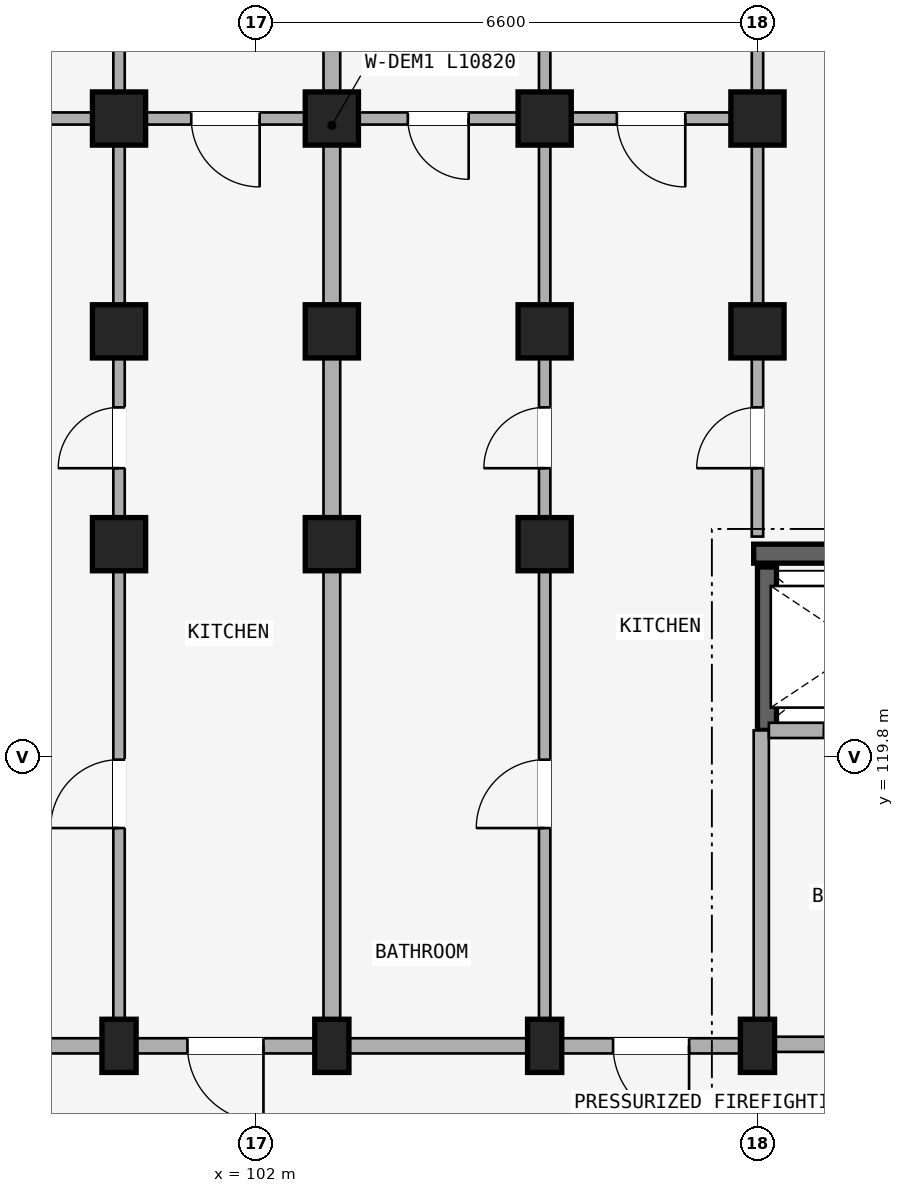
"""IFC4 building model, lengths in metres.
Left out: names, types, materials, properties, quantities, classifications, styles, units other than length and angle.
Written with IfcOpenShell. Run it as: python <this file> out.ifc"""

import sys

from ifc_helpers import new_model, si_unit, direction, frame, frame_2d, origin, origin_2d, place, context, subcontext, project, spatial, rectangle, extrude, element, fill, save


model = new_model("IFC4")
c1 = context("Model", 3, precision=1e-05, world=origin(), true_north=direction((0.0, 1.0)))
c2 = subcontext(c1, "Body", "Model", "MODEL_VIEW")
j1 = project(units=[si_unit("LENGTHUNIT", "METRE"), si_unit("PLANEANGLEUNIT", "RADIAN")], contexts=[c1])
p1 = place(None, origin())
s1 = spatial("IfcSite", under=j1, at=p1, CompositionType="ELEMENT")
p2 = place(p1, origin())
s2 = spatial("IfcBuilding", under=s1, at=p2, CompositionType="ELEMENT")
p3 = place(p2, frame((0.0, 0.0, 21.3)))
s3 = spatial("IfcBuildingStorey", under=s2, at=p3, CompositionType="ELEMENT", Elevation=21.3)
p4 = place(p3, frame((111.35, 122.475, 0.0), z_axis=(0.0, 0.0, 1.0), x_axis=(-1.0, 0.0, 0.0)))
e1 = element("IfcWall", 1, at=p4, inside=s3, PredefinedType="SHEAR", context=c2, shape_type="SweptSolid", body=[
    extrude(rectangle(XDim=2.8, YDim=0.25, at=frame_2d((1.4, 0.0))), origin(), (0.0, 0.0, 1.0), 2.93),
])
p5 = place(p3, frame((108.725, 120.15, 0.0), z_axis=(0.0, 0.0, 1.0), x_axis=(0.0, 1.0, 0.0)))
e2 = element("IfcWall", 2, at=p5, inside=s3, PredefinedType="SHEAR", context=c2, shape_type="SweptSolid", body=[
    extrude(rectangle(XDim=2.15, YDim=0.25, at=frame_2d((1.075, 0.0))), origin(), (0.0, 0.0, 1.0), 2.93),
])
p6 = place(p3, frame((108.6, 116.0, 0.0), z_axis=(0.0, 0.0, 1.0), x_axis=(1.0, 0.0, 0.0)))
e3 = element("IfcColumn", 3, at=p6, inside=s3, PredefinedType="COLUMN", context=c2, shape_type="SweptSolid", body=[
    extrude(rectangle(XDim=0.45, YDim=0.7, at=origin_2d()), origin(), (0.0, 0.0, 1.0), 2.93),
])
for number, where, z_axis, x_axis in (
    (4, (108.6, 125.4, 0.0), (0.0, 0.0, 1.0), (1.0, 0.0, 0.0)),
    (5, (108.6, 128.2, 0.0), (0.0, 0.0, 1.0), (1.0, 0.0, 0.0)),
):
    element("IfcColumn", number, at=place(p3, frame(where, z_axis=z_axis, x_axis=x_axis)), inside=s3, PredefinedType="COLUMN", context=c2, shape_type="SweptSolid", body=[
        extrude(rectangle(XDim=0.7, YDim=0.7, at=origin_2d()), origin(), (0.0, 0.0, 1.0), 2.93),
    ])
p7 = place(p3, frame((105.8, 116.0, 0.0), z_axis=(0.0, 0.0, 1.0), x_axis=(1.0, 0.0, 0.0)))
e6 = element("IfcColumn", 6, at=p7, inside=s3, PredefinedType="COLUMN", context=c2, shape_type="SweptSolid", body=[
    extrude(rectangle(XDim=0.45, YDim=0.7, at=origin_2d()), origin(), (0.0, 0.0, 1.0), 2.93),
])
for number, where, z_axis, x_axis in (
    (7, (105.8, 122.6, 0.0), (0.0, 0.0, 1.0), (1.0, 0.0, 0.0)),
    (8, (105.8, 125.4, 0.0), (0.0, 0.0, 1.0), (1.0, 0.0, 0.0)),
    (9, (105.8, 128.2, 0.0), (0.0, 0.0, 1.0), (1.0, 0.0, 0.0)),
):
    element("IfcColumn", number, at=place(p3, frame(where, z_axis=z_axis, x_axis=x_axis)), inside=s3, PredefinedType="COLUMN", context=c2, shape_type="SweptSolid", body=[
        extrude(rectangle(XDim=0.7, YDim=0.7, at=origin_2d()), origin(), (0.0, 0.0, 1.0), 2.93),
    ])
p8 = place(p3, frame((103.0, 116.0, 0.0), z_axis=(0.0, 0.0, 1.0), x_axis=(1.0, 0.0, 0.0)))
e10 = element("IfcColumn", 10, at=p8, inside=s3, PredefinedType="COLUMN", context=c2, shape_type="SweptSolid", body=[
    extrude(rectangle(XDim=0.45, YDim=0.7, at=origin_2d()), origin(), (0.0, 0.0, 1.0), 2.93),
])
for number, where, z_axis, x_axis in (
    (11, (103.0, 122.6, 0.0), (0.0, 0.0, 1.0), (1.0, 0.0, 0.0)),
    (12, (103.0, 125.4, 0.0), (0.0, 0.0, 1.0), (1.0, 0.0, 0.0)),
    (13, (103.0, 128.2, 0.0), (0.0, 0.0, 1.0), (1.0, 0.0, 0.0)),
):
    element("IfcColumn", number, at=place(p3, frame(where, z_axis=z_axis, x_axis=x_axis)), inside=s3, PredefinedType="COLUMN", context=c2, shape_type="SweptSolid", body=[
        extrude(rectangle(XDim=0.7, YDim=0.7, at=origin_2d()), origin(), (0.0, 0.0, 1.0), 2.93),
    ])
p9 = place(p3, frame((100.2, 116.0, 0.0), z_axis=(0.0, 0.0, 1.0), x_axis=(1.0, 0.0, 0.0)))
e14 = element("IfcColumn", 14, at=p9, inside=s3, PredefinedType="COLUMN", context=c2, shape_type="SweptSolid", body=[
    extrude(rectangle(XDim=0.45, YDim=0.7, at=origin_2d()), origin(), (0.0, 0.0, 1.0), 2.93),
])
for number, where, z_axis, x_axis in (
    (15, (100.2, 122.6, 0.0), (0.0, 0.0, 1.0), (1.0, 0.0, 0.0)),
    (16, (100.2, 125.4, 0.0), (0.0, 0.0, 1.0), (1.0, 0.0, 0.0)),
    (17, (100.2, 128.2, 0.0), (0.0, 0.0, 1.0), (1.0, 0.0, 0.0)),
):
    element("IfcColumn", number, at=place(p3, frame(where, z_axis=z_axis, x_axis=x_axis)), inside=s3, PredefinedType="COLUMN", context=c2, shape_type="SweptSolid", body=[
        extrude(rectangle(XDim=0.7, YDim=0.7, at=origin_2d()), origin(), (0.0, 0.0, 1.0), 2.93),
    ])
p10 = place(p3, frame((114.3, 116.02, 0.0), z_axis=(0.0, 0.0, 1.0), x_axis=(-1.0, 0.0, 0.0)))
e18 = element("IfcWall", 18, at=p10, inside=s3, PredefinedType="STANDARD", context=c2, shape_type="SweptSolid", body=[
    extrude(rectangle(XDim=5.65, YDim=0.2, at=frame_2d((2.825, 0.0))), origin(), (0.0, 0.0, 1.0), 2.372),
])
p11 = place(p10, frame((1.923, 0.0, 0.0)))
e19 = element("IfcOpeningElement", 19, at=p11, cuts=e18, PredefinedType="OPENING", context=c2, shape_type="SweptSolid", body=[
    extrude(rectangle(XDim=1.24, YDim=2.15, at=frame_2d((0.62, 1.075))), frame((0.0, 0.11, 0.0), z_axis=(0.0, -1.0, 0.0), x_axis=(1.0, 0.0, 0.0)), (0.0, 0.0, 1.0), 0.22),
])
p12 = place(p3, frame((108.65, 116.02, 0.0), z_axis=(0.0, 0.0, 1.0), x_axis=(0.0, 1.0, 0.0)))
e20 = element("IfcWall", 20, at=p12, inside=s3, PredefinedType="STANDARD", context=c2, shape_type="SweptSolid", body=[
    extrude(rectangle(XDim=4.13, YDim=0.2, at=frame_2d((2.065, 0.0))), origin(), (0.0, 0.0, 1.0), 2.372),
])
p13 = place(p3, frame((111.3, 120.15, 0.0), z_axis=(0.0, 0.0, 1.0), x_axis=(-1.0, 0.0, 0.0)))
e21 = element("IfcWall", 21, at=p13, inside=s3, PredefinedType="STANDARD", context=c2, shape_type="SweptSolid", body=[
    extrude(rectangle(XDim=2.55, YDim=0.2, at=frame_2d((1.275, 0.0))), origin(), (0.0, 0.0, 1.0), 2.372),
])
p14 = place(p13, frame((0.725, 0.0, 0.0)))
e22 = element("IfcOpeningElement", 22, at=p14, cuts=e21, PredefinedType="OPENING", context=c2, shape_type="SweptSolid", body=[
    extrude(rectangle(XDim=1.1, YDim=2.15, at=frame_2d((0.55, 1.075))), frame((0.0, 0.11, 0.0), z_axis=(0.0, -1.0, 0.0), x_axis=(1.0, 0.0, 0.0)), (0.0, 0.0, 1.0), 0.22),
])
p15 = place(p3, frame((108.6, 116.0, 0.0), z_axis=(0.0, 0.0, 1.0), x_axis=(-1.0, 0.0, 0.0)))
e23 = element("IfcWall", 23, at=p15, inside=s3, PredefinedType="STANDARD", context=c2, shape_type="SweptSolid", body=[
    extrude(rectangle(XDim=2.8, YDim=0.2, at=frame_2d((1.4, 0.0))), origin(), (0.0, 0.0, 1.0), 2.372),
])
p16 = place(p15, frame((0.9, 0.0, 0.0)))
e24 = element("IfcOpeningElement", 24, at=p16, cuts=e23, PredefinedType="OPENING", context=c2, shape_type="SweptSolid", body=[
    extrude(rectangle(XDim=1.0, YDim=2.15, at=frame_2d((0.5, 1.075))), frame((0.0, 0.11, 0.0), z_axis=(0.0, -1.0, 0.0), x_axis=(1.0, 0.0, 0.0)), (0.0, 0.0, 1.0), 0.22),
])
p17 = place(p3, frame((108.52, 128.2, 0.0), z_axis=(0.0, 0.0, 1.0), x_axis=(-1.0, 0.0, 0.0)))
e25 = element("IfcWall", 25, at=p17, inside=s3, PredefinedType="PLUMBINGWALL", context=c2, shape_type="SweptSolid", body=[
    extrude(rectangle(XDim=2.64, YDim=0.16, at=frame_2d((1.32, 0.0))), origin(), (0.0, 0.0, 1.0), 2.372),
])
p18 = place(p17, frame((0.87, 0.0, 0.0)))
e26 = element("IfcOpeningElement", 26, at=p18, cuts=e25, PredefinedType="OPENING", context=c2, shape_type="SweptSolid", body=[
    extrude(rectangle(XDim=0.9, YDim=2.1, at=frame_2d((0.45, 1.05))), frame((0.0, 0.09, 0.0), z_axis=(0.0, -1.0, 0.0), x_axis=(1.0, 0.0, 0.0)), (0.0, 0.0, 1.0), 0.18),
])
p19 = place(p3, frame((105.8, 116.0, 0.0), z_axis=(0.0, 0.0, 1.0), x_axis=(-1.0, 0.0, 0.0)))
e27 = element("IfcWall", 27, at=p19, inside=s3, PredefinedType="STANDARD", context=c2, shape_type="SweptSolid", body=[
    extrude(rectangle(XDim=2.8, YDim=0.2, at=frame_2d((1.4, 0.0))), origin(), (0.0, 0.0, 1.0), 2.372),
])
p20 = place(p3, frame((105.72, 128.2, 0.0), z_axis=(0.0, 0.0, 1.0), x_axis=(-1.0, 0.0, 0.0)))
e28 = element("IfcWall", 28, at=p20, inside=s3, PredefinedType="PLUMBINGWALL", context=c2, shape_type="SweptSolid", body=[
    extrude(rectangle(XDim=2.64, YDim=0.16, at=frame_2d((1.32, 0.0))), origin(), (0.0, 0.0, 1.0), 2.372),
])
p21 = place(p20, frame((0.92, 0.0, 0.0)))
e29 = element("IfcOpeningElement", 29, at=p21, cuts=e28, PredefinedType="OPENING", context=c2, shape_type="SweptSolid", body=[
    extrude(rectangle(XDim=0.8, YDim=2.1, at=frame_2d((0.4, 1.05))), frame((0.0, 0.09, 0.0), z_axis=(0.0, -1.0, 0.0), x_axis=(1.0, 0.0, 0.0)), (0.0, 0.0, 1.0), 0.18),
])
p22 = place(p3, frame((103.0, 116.0, 0.0), z_axis=(0.0, 0.0, 1.0), x_axis=(-1.0, 0.0, 0.0)))
e30 = element("IfcWall", 30, at=p22, inside=s3, PredefinedType="STANDARD", context=c2, shape_type="SweptSolid", body=[
    extrude(rectangle(XDim=2.8, YDim=0.2, at=frame_2d((1.4, 0.0))), origin(), (0.0, 0.0, 1.0), 2.372),
])
p23 = place(p22, frame((0.9, 0.0, 0.0)))
e31 = element("IfcOpeningElement", 31, at=p23, cuts=e30, PredefinedType="OPENING", context=c2, shape_type="SweptSolid", body=[
    extrude(rectangle(XDim=1.0, YDim=2.15, at=frame_2d((0.5, 1.075))), frame((0.0, 0.11, 0.0), z_axis=(0.0, -1.0, 0.0), x_axis=(1.0, 0.0, 0.0)), (0.0, 0.0, 1.0), 0.22),
])
p24 = place(p3, frame((102.92, 128.2, 0.0), z_axis=(0.0, 0.0, 1.0), x_axis=(-1.0, 0.0, 0.0)))
e32 = element("IfcWall", 32, at=p24, inside=s3, PredefinedType="PLUMBINGWALL", context=c2, shape_type="SweptSolid", body=[
    extrude(rectangle(XDim=2.64, YDim=0.16, at=frame_2d((1.32, 0.0))), origin(), (0.0, 0.0, 1.0), 2.372),
])
p25 = place(p24, frame((0.87, 0.0, 0.0)))
e33 = element("IfcOpeningElement", 33, at=p25, cuts=e32, PredefinedType="OPENING", context=c2, shape_type="SweptSolid", body=[
    extrude(rectangle(XDim=0.9, YDim=2.1, at=frame_2d((0.45, 1.05))), frame((0.0, 0.09, 0.0), z_axis=(0.0, -1.0, 0.0), x_axis=(1.0, 0.0, 0.0)), (0.0, 0.0, 1.0), 0.18),
])
p26 = place(p3, frame((100.2, 116.0, 0.0), z_axis=(0.0, 0.0, 1.0), x_axis=(-1.0, 0.0, 0.0)))
e34 = element("IfcWall", 34, at=p26, inside=s3, PredefinedType="STANDARD", context=c2, shape_type="SweptSolid", body=[
    extrude(rectangle(XDim=2.8, YDim=0.2, at=frame_2d((1.4, 0.0))), origin(), (0.0, 0.0, 1.0), 2.372),
])
p27 = place(p3, frame((100.12, 128.2, 0.0), z_axis=(0.0, 0.0, 1.0), x_axis=(-1.0, 0.0, 0.0)))
e35 = element("IfcWall", 35, at=p27, inside=s3, PredefinedType="PLUMBINGWALL", context=c2, shape_type="SweptSolid", body=[
    extrude(rectangle(XDim=2.64, YDim=0.16, at=frame_2d((1.32, 0.0))), origin(), (0.0, 0.0, 1.0), 2.372),
])
p28 = place(p27, frame((0.92, 0.0, 0.0)))
e36 = element("IfcOpeningElement", 36, at=p28, cuts=e35, PredefinedType="OPENING", context=c2, shape_type="SweptSolid", body=[
    extrude(rectangle(XDim=0.8, YDim=2.1, at=frame_2d((0.4, 1.05))), frame((0.0, 0.09, 0.0), z_axis=(0.0, -1.0, 0.0), x_axis=(1.0, 0.0, 0.0)), (0.0, 0.0, 1.0), 0.18),
])
p29 = place(p3, frame((108.6, 122.7, 0.0), z_axis=(0.0, 0.0, 1.0), x_axis=(0.0, 1.0, 0.0)))
e37 = element("IfcWall", 37, at=p29, inside=s3, PredefinedType="PARTITIONING", context=c2, shape_type="SweptSolid", body=[
    extrude(rectangle(XDim=10.82, YDim=0.15, at=frame_2d((5.41, 0.0))), origin(), (0.0, 0.0, 1.0), 2.372),
])
p30 = place(p29, frame((0.899, 0.0, 0.0)))
e38 = element("IfcOpeningElement", 38, at=p30, cuts=e37, PredefinedType="OPENING", context=c2, shape_type="SweptSolid", body=[
    extrude(rectangle(XDim=0.8, YDim=2.1, at=frame_2d((0.4, 1.05))), frame((0.0, 0.085, 0.0), z_axis=(0.0, -1.0, 0.0), x_axis=(1.0, 0.0, 0.0)), (0.0, 0.0, 1.0), 0.17),
])
p31 = place(p3, frame((105.8, 116.05, 0.0), z_axis=(0.0, 0.0, 1.0), x_axis=(0.0, 1.0, 0.0)))
e39 = element("IfcWall", 39, at=p31, inside=s3, PredefinedType="PARTITIONING", context=c2, shape_type="SweptSolid", body=[
    extrude(rectangle(XDim=6.53, YDim=0.15, at=frame_2d((3.265, 0.0))), origin(), (0.0, 0.0, 1.0), 2.372),
])
p32 = place(p31, frame((2.815, 0.0, 0.0)))
e40 = element("IfcOpeningElement", 40, at=p32, cuts=e39, PredefinedType="OPENING", context=c2, shape_type="SweptSolid", body=[
    extrude(rectangle(XDim=0.9, YDim=2.1, at=frame_2d((0.45, 1.05))), frame((0.0, 0.085, 0.0), z_axis=(0.0, -1.0, 0.0), x_axis=(1.0, 0.0, 0.0)), (0.0, 0.0, 1.0), 0.17),
])
p33 = place(p3, frame((105.8, 122.7, 0.0), z_axis=(0.0, 0.0, 1.0), x_axis=(0.0, 1.0, 0.0)))
e41 = element("IfcWall", 41, at=p33, inside=s3, PredefinedType="PARTITIONING", context=c2, shape_type="SweptSolid", body=[
    extrude(rectangle(XDim=10.82, YDim=0.15, at=frame_2d((5.41, 0.0))), origin(), (0.0, 0.0, 1.0), 2.372),
])
p34 = place(p33, frame((0.899, 0.0, 0.0)))
e42 = element("IfcOpeningElement", 42, at=p34, cuts=e41, PredefinedType="OPENING", context=c2, shape_type="SweptSolid", body=[
    extrude(rectangle(XDim=0.8, YDim=2.1, at=frame_2d((0.4, 1.05))), frame((0.0, 0.085, 0.0), z_axis=(0.0, -1.0, 0.0), x_axis=(1.0, 0.0, 0.0)), (0.0, 0.0, 1.0), 0.17),
])
p35 = place(p3, frame((103.0, 116.05, 0.0), z_axis=(0.0, 0.0, 1.0), x_axis=(0.0, 1.0, 0.0)))
e43 = element("IfcWall", 43, at=p35, inside=s3, PredefinedType="STANDARD", context=c2, shape_type="SweptSolid", body=[
    extrude(rectangle(XDim=6.53, YDim=0.22, at=frame_2d((3.265, 0.0))), origin(), (0.0, 0.0, 1.0), 2.372),
])
p36 = place(p3, frame((103.0, 122.7, 0.0), z_axis=(0.0, 0.0, 1.0), x_axis=(0.0, 1.0, 0.0)))
e44 = element("IfcWall", 44, at=p36, inside=s3, PredefinedType="STANDARD", context=c2, shape_type="SweptSolid", body=[
    extrude(rectangle(XDim=10.82, YDim=0.22, at=frame_2d((5.41, 0.0))), origin(), (0.0, 0.0, 1.0), 2.372),
])
p37 = place(p3, frame((100.2, 116.05, 0.0), z_axis=(0.0, 0.0, 1.0), x_axis=(0.0, 1.0, 0.0)))
e45 = element("IfcWall", 45, at=p37, inside=s3, PredefinedType="PARTITIONING", context=c2, shape_type="SweptSolid", body=[
    extrude(rectangle(XDim=6.53, YDim=0.15, at=frame_2d((3.265, 0.0))), origin(), (0.0, 0.0, 1.0), 2.372),
])
p38 = place(p37, frame((2.815, 0.0, 0.0)))
e46 = element("IfcOpeningElement", 46, at=p38, cuts=e45, PredefinedType="OPENING", context=c2, shape_type="SweptSolid", body=[
    extrude(rectangle(XDim=0.9, YDim=2.1, at=frame_2d((0.45, 1.05))), frame((0.0, 0.085, 0.0), z_axis=(0.0, -1.0, 0.0), x_axis=(1.0, 0.0, 0.0)), (0.0, 0.0, 1.0), 0.17),
])
p39 = place(p3, frame((100.2, 122.7, 0.0), z_axis=(0.0, 0.0, 1.0), x_axis=(0.0, 1.0, 0.0)))
e47 = element("IfcWall", 47, at=p39, inside=s3, PredefinedType="PARTITIONING", context=c2, shape_type="SweptSolid", body=[
    extrude(rectangle(XDim=10.82, YDim=0.15, at=frame_2d((5.41, 0.0))), origin(), (0.0, 0.0, 1.0), 2.372),
])
p40 = place(p39, frame((0.899, 0.0, 0.0)))
e48 = element("IfcOpeningElement", 48, at=p40, cuts=e47, PredefinedType="OPENING", context=c2, shape_type="SweptSolid", body=[
    extrude(rectangle(XDim=0.8, YDim=2.1, at=frame_2d((0.4, 1.05))), frame((0.0, 0.085, 0.0), z_axis=(0.0, -1.0, 0.0), x_axis=(1.0, 0.0, 0.0)), (0.0, 0.0, 1.0), 0.17),
])
p41 = place(p14, origin())
e49 = element("IfcDoor", 49, at=p41, inside=s3, OperationType="SLIDING_TO_LEFT", PredefinedType="DOOR", context=c2, shape_type="SweptSolid", body=[
    extrude(rectangle(XDim=1.1, YDim=2.15, at=frame_2d((0.55, 1.075))), frame((0.0, 0.025, 0.0), z_axis=(0.0, -1.0, 0.0), x_axis=(1.0, 0.0, 0.0)), (0.0, 0.0, 1.0), 0.05),
])
fill(e22, e49)
p42 = place(p18, origin())
e50 = element("IfcDoor", 50, at=p42, inside=s3, OperationType="SINGLE_SWING_LEFT", PredefinedType="DOOR", context=c2, shape_type="SweptSolid", body=[
    extrude(rectangle(XDim=0.9, YDim=2.1, at=frame_2d((0.45, 1.05))), frame((0.0, 0.025, 0.0), z_axis=(0.0, -1.0, 0.0), x_axis=(1.0, 0.0, 0.0)), (0.0, 0.0, 1.0), 0.05),
])
fill(e26, e50)
p43 = place(p16, frame((1.0, 0.0, 0.0), z_axis=(0.0, 0.0, 1.0), x_axis=(-1.0, 0.0, 0.0)))
e51 = element("IfcDoor", 51, at=p43, inside=s3, OperationType="SINGLE_SWING_RIGHT", PredefinedType="DOOR", context=c2, shape_type="SweptSolid", body=[
    extrude(rectangle(XDim=1.0, YDim=2.15, at=frame_2d((0.5, 1.075))), frame((0.0, 0.025, 0.0), z_axis=(0.0, -1.0, 0.0), x_axis=(1.0, 0.0, 0.0)), (0.0, 0.0, 1.0), 0.05),
])
fill(e24, e51)
p44 = place(p21, origin())
e52 = element("IfcDoor", 52, at=p44, inside=s3, OperationType="SINGLE_SWING_LEFT", PredefinedType="DOOR", context=c2, shape_type="SweptSolid", body=[
    extrude(rectangle(XDim=0.8, YDim=2.1, at=frame_2d((0.4, 1.05))), frame((0.0, 0.025, 0.0), z_axis=(0.0, -1.0, 0.0), x_axis=(1.0, 0.0, 0.0)), (0.0, 0.0, 1.0), 0.05),
])
fill(e29, e52)
p45 = place(p25, origin())
e53 = element("IfcDoor", 53, at=p45, inside=s3, OperationType="SINGLE_SWING_LEFT", PredefinedType="DOOR", context=c2, shape_type="SweptSolid", body=[
    extrude(rectangle(XDim=0.9, YDim=2.1, at=frame_2d((0.45, 1.05))), frame((0.0, 0.025, 0.0), z_axis=(0.0, -1.0, 0.0), x_axis=(1.0, 0.0, 0.0)), (0.0, 0.0, 1.0), 0.05),
])
fill(e33, e53)
p46 = place(p23, frame((1.0, 0.0, 0.0), z_axis=(0.0, 0.0, 1.0), x_axis=(-1.0, 0.0, 0.0)))
e54 = element("IfcDoor", 54, at=p46, inside=s3, OperationType="SINGLE_SWING_RIGHT", PredefinedType="DOOR", context=c2, shape_type="SweptSolid", body=[
    extrude(rectangle(XDim=1.0, YDim=2.15, at=frame_2d((0.5, 1.075))), frame((0.0, 0.025, 0.0), z_axis=(0.0, -1.0, 0.0), x_axis=(1.0, 0.0, 0.0)), (0.0, 0.0, 1.0), 0.05),
])
fill(e31, e54)
p47 = place(p30, frame((0.8, 0.0, 0.0), z_axis=(0.0, 0.0, 1.0), x_axis=(-1.0, 0.0, 0.0)))
e55 = element("IfcDoor", 55, at=p47, inside=s3, OperationType="SINGLE_SWING_RIGHT", PredefinedType="DOOR", context=c2, shape_type="SweptSolid", body=[
    extrude(rectangle(XDim=0.8, YDim=2.1, at=frame_2d((0.4, 1.05))), frame((0.0, 0.025, 0.0), z_axis=(0.0, -1.0, 0.0), x_axis=(1.0, 0.0, 0.0)), (0.0, 0.0, 1.0), 0.05),
])
fill(e38, e55)
p48 = place(p32, frame((0.9, 0.0, 0.0), z_axis=(0.0, 0.0, 1.0), x_axis=(-1.0, 0.0, 0.0)))
e56 = element("IfcDoor", 56, at=p48, inside=s3, OperationType="SINGLE_SWING_RIGHT", PredefinedType="DOOR", context=c2, shape_type="SweptSolid", body=[
    extrude(rectangle(XDim=0.9, YDim=2.1, at=frame_2d((0.45, 1.05))), frame((0.0, 0.025, 0.0), z_axis=(0.0, -1.0, 0.0), x_axis=(1.0, 0.0, 0.0)), (0.0, 0.0, 1.0), 0.05),
])
fill(e40, e56)
p49 = place(p34, origin())
e57 = element("IfcDoor", 57, at=p49, inside=s3, OperationType="SINGLE_SWING_LEFT", PredefinedType="DOOR", context=c2, shape_type="SweptSolid", body=[
    extrude(rectangle(XDim=0.8, YDim=2.1, at=frame_2d((0.4, 1.05))), frame((0.0, 0.025, 0.0), z_axis=(0.0, -1.0, 0.0), x_axis=(1.0, 0.0, 0.0)), (0.0, 0.0, 1.0), 0.05),
])
fill(e42, e57)
p50 = place(p38, origin())
e58 = element("IfcDoor", 58, at=p50, inside=s3, OperationType="SINGLE_SWING_LEFT", PredefinedType="DOOR", context=c2, shape_type="SweptSolid", body=[
    extrude(rectangle(XDim=0.9, YDim=2.1, at=frame_2d((0.45, 1.05))), frame((0.0, 0.025, 0.0), z_axis=(0.0, -1.0, 0.0), x_axis=(1.0, 0.0, 0.0)), (0.0, 0.0, 1.0), 0.05),
])
fill(e46, e58)
p51 = place(p40, frame((0.8, 0.0, 0.0), z_axis=(0.0, 0.0, 1.0), x_axis=(-1.0, 0.0, 0.0)))
e59 = element("IfcDoor", 59, at=p51, inside=s3, OperationType="SINGLE_SWING_RIGHT", PredefinedType="DOOR", context=c2, shape_type="SweptSolid", body=[
    extrude(rectangle(XDim=0.8, YDim=2.1, at=frame_2d((0.4, 1.05))), frame((0.0, 0.025, 0.0), z_axis=(0.0, -1.0, 0.0), x_axis=(1.0, 0.0, 0.0)), (0.0, 0.0, 1.0), 0.05),
])
fill(e48, e59)
save(model, sys.argv[1])
